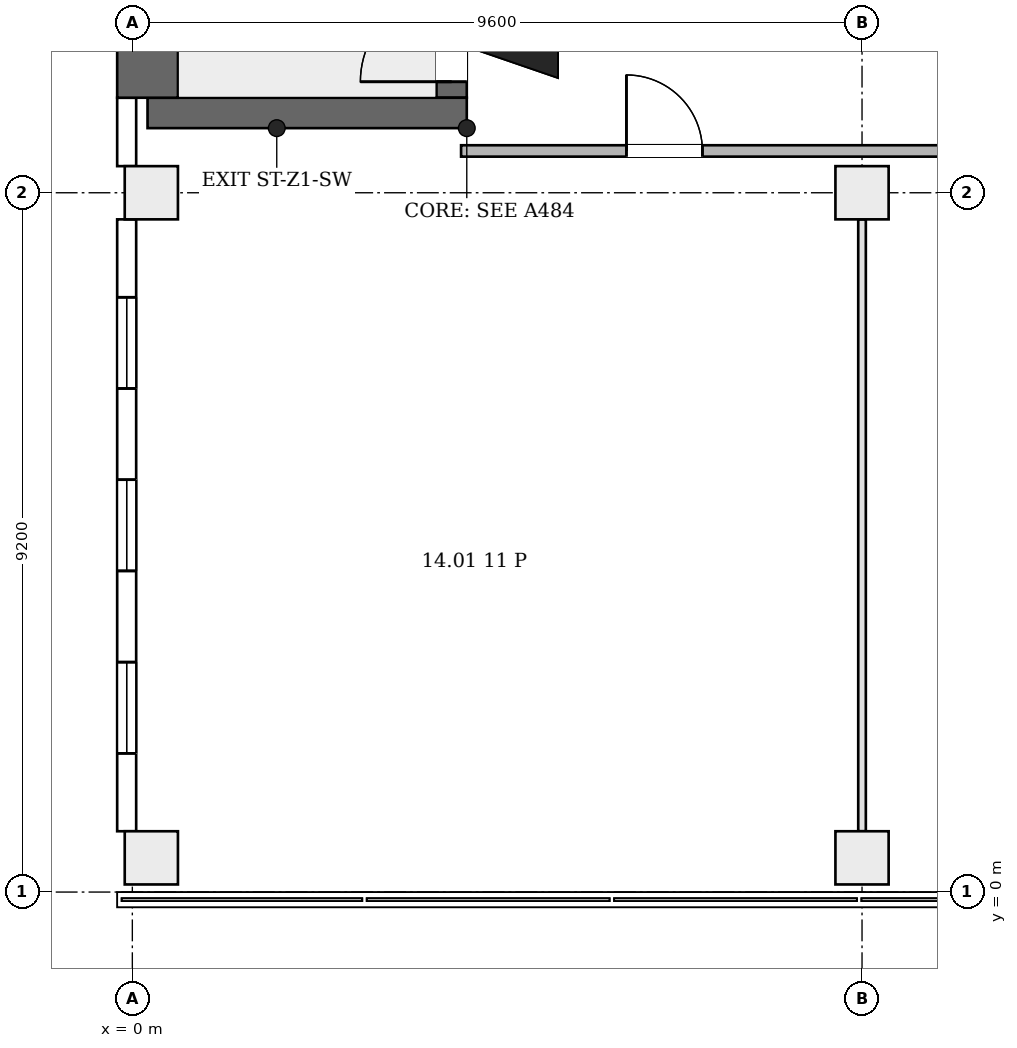
"""IFC4 building model, lengths in metres.
Left out: names, types, materials, properties, quantities, classifications, styles, units other than length and angle.
Written with IfcOpenShell. Run it as: python <this file> out.ifc"""

import sys

from ifc_helpers import new_model, si_unit, direction, frame, frame_2d, origin, origin_2d, place, context, subcontext, project, spatial, rectangle, extrude, element, fill, save


model = new_model("IFC4")
c1 = context("Model", 3, precision=1e-05, world=origin(), true_north=direction((0.0, 1.0)))
c2 = subcontext(c1, "Body", "Model", "MODEL_VIEW")
j1 = project(units=[si_unit("LENGTHUNIT", "METRE"), si_unit("PLANEANGLEUNIT", "RADIAN")], contexts=[c1])
p1 = place(None, origin())
s1 = spatial("IfcSite", under=j1, at=p1, CompositionType="ELEMENT")
p2 = place(p1, origin())
s2 = spatial("IfcBuilding", under=s1, at=p2, CompositionType="ELEMENT")
p3 = place(p2, frame((0.0, 0.0, 69.7)))
s3 = spatial("IfcBuildingStorey", under=s2, at=p3, CompositionType="ELEMENT", Elevation=69.7)
p4 = place(p3, frame((0.2, 10.25, 0.0), z_axis=(0.0, 0.0, 1.0), x_axis=(1.0, 0.0, 0.0)))
e1 = element("IfcWall", 1, at=p4, inside=s3, PredefinedType="SHEAR", context=c2, shape_type="SweptSolid", body=[
    extrude(rectangle(XDim=4.2, YDim=0.4, at=frame_2d((2.1, 0.0))), origin(), (0.0, 0.0, 1.0), 4.2),
])
p5 = place(p3, frame((0.2, 10.45, 0.0), z_axis=(0.0, 0.0, 1.0), x_axis=(0.0, 1.0, 0.0)))
e2 = element("IfcWall", 2, at=p5, inside=s3, PredefinedType="SHEAR", context=c2, shape_type="SweptSolid", body=[
    extrude(rectangle(XDim=6.6, YDim=0.8, at=frame_2d((3.3, 0.0))), origin(), (0.0, 0.0, 1.0), 4.2),
])
p6 = place(p3, frame((4.2, 10.45, 0.0), z_axis=(0.0, 0.0, 1.0), x_axis=(0.0, 1.0, 0.0)))
e3 = element("IfcWall", 3, at=p6, inside=s3, PredefinedType="SHEAR", context=c2, shape_type="SweptSolid", body=[
    extrude(rectangle(XDim=6.6, YDim=0.4, at=frame_2d((3.3, 0.0))), origin(), (0.0, 0.0, 1.0), 4.2),
])
p7 = place(p6, frame((0.21, 0.0, 0.0)))
e4 = element("IfcOpeningElement", 4, at=p7, cuts=e3, PredefinedType="OPENING", context=c2, shape_type="SweptSolid", body=[
    extrude(rectangle(XDim=1.2, YDim=2.1, at=frame_2d((0.6, 1.05))), frame((0.0, 0.21, 0.0), z_axis=(0.0, -1.0, 0.0), x_axis=(1.0, 0.0, 0.0)), (0.0, 0.0, 1.0), 0.42),
])
for number, where, z_axis, x_axis in (
    (5, (0.25, 0.45, 0.0), (0.0, 0.0, 1.0), (1.0, 0.0, 0.0)),
    (6, (9.6, 0.45, 0.0), (0.0, 0.0, 1.0), (1.0, 0.0, 0.0)),
    (7, (0.25, 9.2, 0.0), (0.0, 0.0, 1.0), (1.0, 0.0, 0.0)),
    (8, (9.6, 9.2, 0.0), (0.0, 0.0, 1.0), (1.0, 0.0, 0.0)),
):
    element("IfcColumn", number, at=place(p3, frame(where, z_axis=z_axis, x_axis=x_axis)), inside=s3, PredefinedType="COLUMN", context=c2, shape_type="SweptSolid", body=[
        extrude(rectangle(XDim=0.7, YDim=0.7, at=origin_2d()), origin(), (0.0, 0.0, 1.0), 4.2),
    ])
p8 = place(p3, frame((-0.074, 8.85, 0.0), z_axis=(0.0, 0.0, 1.0), x_axis=(0.0, -1.0, 0.0)))
e9 = element("IfcWall", 9, at=p8, inside=s3, PredefinedType="ELEMENTEDWALL", context=c2, shape_type="SweptSolid", body=[
    extrude(rectangle(XDim=8.05, YDim=0.25, at=frame_2d((4.025, 0.0))), origin(), (0.0, 0.0, 1.0), 3.9),
])
p9 = place(p8, frame((5.825, 0.0, 0.9)))
e10 = element("IfcOpeningElement", 10, at=p9, cuts=e9, PredefinedType="OPENING", context=c2, shape_type="SweptSolid", body=[
    extrude(rectangle(XDim=1.2, YDim=2.6, at=frame_2d((0.6, 1.3))), frame((0.0, 0.135, 0.0), z_axis=(0.0, -1.0, 0.0), x_axis=(1.0, 0.0, 0.0)), (0.0, 0.0, 1.0), 0.27),
])
p10 = place(p8, frame((3.425, 0.0, 0.9)))
e11 = element("IfcOpeningElement", 11, at=p10, cuts=e9, PredefinedType="OPENING", context=c2, shape_type="SweptSolid", body=[
    extrude(rectangle(XDim=1.2, YDim=2.6, at=frame_2d((0.6, 1.3))), frame((0.0, 0.135, 0.0), z_axis=(0.0, -1.0, 0.0), x_axis=(1.0, 0.0, 0.0)), (0.0, 0.0, 1.0), 0.27),
])
p11 = place(p8, frame((1.025, 0.0, 0.9)))
e12 = element("IfcOpeningElement", 12, at=p11, cuts=e9, PredefinedType="OPENING", context=c2, shape_type="SweptSolid", body=[
    extrude(rectangle(XDim=1.2, YDim=2.6, at=frame_2d((0.6, 1.3))), frame((0.0, 0.135, 0.0), z_axis=(0.0, -1.0, 0.0), x_axis=(1.0, 0.0, 0.0)), (0.0, 0.0, 1.0), 0.27),
])
p12 = place(p3, frame((-0.074, 10.45, 0.0), z_axis=(0.0, 0.0, 1.0), x_axis=(0.0, -1.0, 0.0)))
e13 = element("IfcWall", 13, at=p12, inside=s3, PredefinedType="ELEMENTEDWALL", context=c2, shape_type="SweptSolid", body=[
    extrude(rectangle(XDim=0.9, YDim=0.25, at=frame_2d((0.45, 0.0))), origin(), (0.0, 0.0, 1.0), 3.9),
])
p13 = place(p3, frame((4.325, 9.75, 0.0), z_axis=(0.0, 0.0, 1.0), x_axis=(1.0, 0.0, 0.0)))
e14 = element("IfcWall", 14, at=p13, inside=s3, PredefinedType="PARTITIONING", context=c2, shape_type="SweptSolid", body=[
    extrude(rectangle(XDim=34.369, YDim=0.15, at=frame_2d((17.185, 0.0))), origin(), (0.0, 0.0, 1.0), 3.9),
])
p14 = place(p13, frame((2.175, 0.0, 0.0)))
e15 = element("IfcOpeningElement", 15, at=p14, cuts=e14, PredefinedType="OPENING", context=c2, shape_type="SweptSolid", body=[
    extrude(rectangle(XDim=1.0, YDim=2.1, at=frame_2d((0.5, 1.05))), frame((0.0, 0.085, 0.0), z_axis=(0.0, -1.0, 0.0), x_axis=(1.0, 0.0, 0.0)), (0.0, 0.0, 1.0), 0.17),
])
p15 = place(p13, frame((11.975, 0.0, 0.0)))
e16 = element("IfcOpeningElement", 16, at=p15, cuts=e14, PredefinedType="OPENING", context=c2, shape_type="SweptSolid", body=[
    extrude(rectangle(XDim=1.0, YDim=2.1, at=frame_2d((0.5, 1.05))), frame((0.0, 0.085, 0.0), z_axis=(0.0, -1.0, 0.0), x_axis=(1.0, 0.0, 0.0)), (0.0, 0.0, 1.0), 0.17),
])
p16 = place(p13, frame((21.575, 0.0, 0.0)))
e17 = element("IfcOpeningElement", 17, at=p16, cuts=e14, PredefinedType="OPENING", context=c2, shape_type="SweptSolid", body=[
    extrude(rectangle(XDim=1.0, YDim=2.1, at=frame_2d((0.5, 1.05))), frame((0.0, 0.085, 0.0), z_axis=(0.0, -1.0, 0.0), x_axis=(1.0, 0.0, 0.0)), (0.0, 0.0, 1.0), 0.17),
])
p17 = place(p13, frame((28.925, 0.0, 0.0)))
e18 = element("IfcOpeningElement", 18, at=p17, cuts=e14, PredefinedType="OPENING", context=c2, shape_type="SweptSolid", body=[
    extrude(rectangle(XDim=1.0, YDim=2.1, at=frame_2d((0.5, 1.05))), frame((0.0, 0.085, 0.0), z_axis=(0.0, -1.0, 0.0), x_axis=(1.0, 0.0, 0.0)), (0.0, 0.0, 1.0), 0.17),
])
p18 = place(p3, frame((9.6, 0.8, 0.0), z_axis=(0.0, 0.0, 1.0), x_axis=(0.0, 1.0, 0.0)))
e19 = element("IfcWall", 19, at=p18, inside=s3, PredefinedType="PARTITIONING", context=c2, shape_type="SweptSolid", body=[
    extrude(rectangle(XDim=8.05, YDim=0.1, at=frame_2d((4.025, 0.0))), origin(), (0.0, 0.0, 1.0), 3.9),
])
p19 = place(p9, origin())
e20 = element("IfcWindow", 20, at=p19, inside=s3, PartitioningType="SINGLE_PANEL", PredefinedType="WINDOW", context=c2, shape_type="SweptSolid", body=[
    extrude(rectangle(XDim=1.2, YDim=2.6, at=frame_2d((0.6, 1.3))), frame((0.0, 0.03, 0.0), z_axis=(0.0, -1.0, 0.0), x_axis=(1.0, 0.0, 0.0)), (0.0, 0.0, 1.0), 0.06),
])
fill(e10, e20)
p20 = place(p10, origin())
e21 = element("IfcWindow", 21, at=p20, inside=s3, PartitioningType="SINGLE_PANEL", PredefinedType="WINDOW", context=c2, shape_type="SweptSolid", body=[
    extrude(rectangle(XDim=1.2, YDim=2.6, at=frame_2d((0.6, 1.3))), frame((0.0, 0.03, 0.0), z_axis=(0.0, -1.0, 0.0), x_axis=(1.0, 0.0, 0.0)), (0.0, 0.0, 1.0), 0.06),
])
fill(e11, e21)
p21 = place(p11, origin())
e22 = element("IfcWindow", 22, at=p21, inside=s3, PartitioningType="SINGLE_PANEL", PredefinedType="WINDOW", context=c2, shape_type="SweptSolid", body=[
    extrude(rectangle(XDim=1.2, YDim=2.6, at=frame_2d((0.6, 1.3))), frame((0.0, 0.03, 0.0), z_axis=(0.0, -1.0, 0.0), x_axis=(1.0, 0.0, 0.0)), (0.0, 0.0, 1.0), 0.06),
])
fill(e12, e22)
p22 = place(p7, origin())
e23 = element("IfcDoor", 23, at=p22, inside=s3, OperationType="SINGLE_SWING_RIGHT", PredefinedType="DOOR", context=c2, shape_type="SweptSolid", body=[
    extrude(rectangle(XDim=1.2, YDim=2.1, at=frame_2d((0.6, 1.05))), frame((0.0, 0.025, 0.0), z_axis=(0.0, -1.0, 0.0), x_axis=(1.0, 0.0, 0.0)), (0.0, 0.0, 1.0), 0.05),
])
fill(e4, e23)
p23 = place(p14, origin())
e24 = element("IfcDoor", 24, at=p23, inside=s3, OperationType="SINGLE_SWING_RIGHT", PredefinedType="DOOR", context=c2, shape_type="SweptSolid", body=[
    extrude(rectangle(XDim=1.0, YDim=2.1, at=frame_2d((0.5, 1.05))), frame((0.0, 0.025, 0.0), z_axis=(0.0, -1.0, 0.0), x_axis=(1.0, 0.0, 0.0)), (0.0, 0.0, 1.0), 0.05),
])
fill(e15, e24)
save(model, sys.argv[1])
